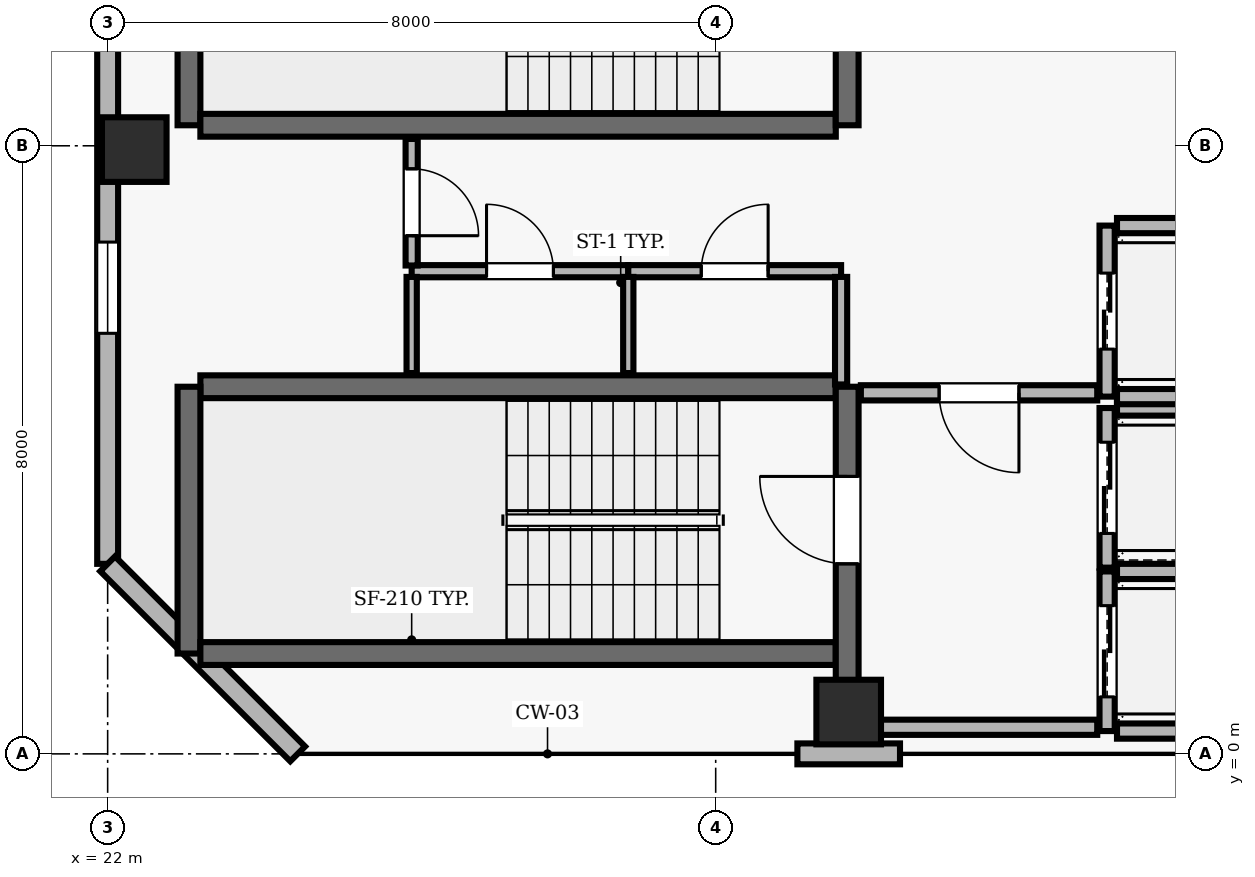
"""IFC4 building model, lengths in metres.
Left out: names, types, materials, properties, quantities, classifications, styles, units other than length and angle.
Written with IfcOpenShell. Run it as: python <this file> out.ifc"""

import sys

from ifc_helpers import new_model, si_unit, direction, frame, frame_2d, origin, origin_2d, place, context, subcontext, project, spatial, rectangle, extrude, element, fill, save


model = new_model("IFC4")
c1 = context("Model", 3, precision=1e-05, world=origin(), true_north=direction((0.0, 1.0)))
c2 = subcontext(c1, "Body", "Model", "MODEL_VIEW")
j1 = project(units=[si_unit("LENGTHUNIT", "METRE"), si_unit("PLANEANGLEUNIT", "RADIAN")], contexts=[c1])
p1 = place(None, origin())
s1 = spatial("IfcSite", under=j1, at=p1, CompositionType="ELEMENT")
p2 = place(p1, origin())
s2 = spatial("IfcBuilding", under=s1, at=p2, CompositionType="ELEMENT")
p3 = place(p2, frame((0.0, 0.0, 295.0)))
s3 = spatial("IfcBuildingStorey", under=s2, at=p3, CompositionType="ELEMENT", Elevation=295.0)
for number, where, z_axis, x_axis in (
    (1, (31.75, 0.55, 0.0), (0.0, 0.0, 1.0), (1.0, 0.0, 0.0)),
    (2, (22.35, 7.95, 0.0), (0.0, 0.0, 1.0), (1.0, 0.0, 0.0)),
):
    element("IfcColumn", number, at=place(p3, frame(where, z_axis=z_axis, x_axis=x_axis)), inside=s3, PredefinedType="COLUMN", context=c2, shape_type="SweptSolid", body=[
        extrude(rectangle(XDim=0.85, YDim=0.85, at=origin_2d()), origin(), (0.0, 0.0, 1.0), 3.9),
    ])
p4 = place(p3, frame((31.075, 0.0, 0.0), z_axis=(0.0, 0.0, 1.0), x_axis=(1.0, 0.0, 0.0)))
e3 = element("IfcWall", 3, at=p4, inside=s3, PredefinedType="SOLIDWALL", context=c2, shape_type="SweptSolid", body=[
    extrude(rectangle(XDim=1.35, YDim=0.275, at=frame_2d((0.675, 0.0))), origin(), (0.0, 0.0, 1.0), 3.69),
])
p5 = place(p3, frame((22.0, 35.3, 0.0), z_axis=(0.0, 0.0, 1.0), x_axis=(0.0, -1.0, 0.0)))
e4 = element("IfcWall", 4, at=p5, inside=s3, PredefinedType="SOLIDWALL", context=c2, shape_type="SweptSolid", body=[
    extrude(rectangle(XDim=32.8, YDim=0.275, at=frame_2d((16.4, 0.0))), origin(), (0.0, 0.0, 1.0), 3.69),
])
p6 = place(p5, frame((7.3, 0.0, 0.0)))
e5 = element("IfcOpeningElement", 5, at=p6, cuts=e4, PredefinedType="OPENING", context=c2, shape_type="SweptSolid", body=[
    extrude(rectangle(XDim=1.0, YDim=2.2, at=frame_2d((0.5, 1.1))), frame((0.0, 0.147, 0.0), z_axis=(0.0, -1.0, 0.0), x_axis=(1.0, 0.0, 0.0)), (0.0, 0.0, 1.0), 0.295),
])
p7 = place(p5, frame((1.233, 0.0, 0.9)))
e6 = element("IfcOpeningElement", 6, at=p7, cuts=e4, PredefinedType="OPENING", context=c2, shape_type="SweptSolid", body=[
    extrude(rectangle(XDim=1.2, YDim=1.6, at=frame_2d((0.6, 0.8))), frame((0.0, 0.147, 0.0), z_axis=(0.0, -1.0, 0.0), x_axis=(1.0, 0.0, 0.0)), (0.0, 0.0, 1.0), 0.295),
])
p8 = place(p5, frame((13.067, 0.0, 0.9)))
e7 = element("IfcOpeningElement", 7, at=p8, cuts=e4, PredefinedType="OPENING", context=c2, shape_type="SweptSolid", body=[
    extrude(rectangle(XDim=1.2, YDim=1.6, at=frame_2d((0.6, 0.8))), frame((0.0, 0.147, 0.0), z_axis=(0.0, -1.0, 0.0), x_axis=(1.0, 0.0, 0.0)), (0.0, 0.0, 1.0), 0.295),
])
p9 = place(p5, frame((18.533, 0.0, 0.9)))
e8 = element("IfcOpeningElement", 8, at=p9, cuts=e4, PredefinedType="OPENING", context=c2, shape_type="SweptSolid", body=[
    extrude(rectangle(XDim=1.2, YDim=1.6, at=frame_2d((0.6, 0.8))), frame((0.0, 0.147, 0.0), z_axis=(0.0, -1.0, 0.0), x_axis=(1.0, 0.0, 0.0)), (0.0, 0.0, 1.0), 0.295),
])
p10 = place(p5, frame((24.0, 0.0, 0.9)))
e9 = element("IfcOpeningElement", 9, at=p10, cuts=e4, PredefinedType="OPENING", context=c2, shape_type="SweptSolid", body=[
    extrude(rectangle(XDim=1.2, YDim=1.6, at=frame_2d((0.6, 0.8))), frame((0.0, 0.147, 0.0), z_axis=(0.0, -1.0, 0.0), x_axis=(1.0, 0.0, 0.0)), (0.0, 0.0, 1.0), 0.295),
])
p11 = place(p5, frame((28.567, 0.0, 0.9)))
e10 = element("IfcOpeningElement", 10, at=p11, cuts=e4, PredefinedType="OPENING", context=c2, shape_type="SweptSolid", body=[
    extrude(rectangle(XDim=1.2, YDim=1.6, at=frame_2d((0.6, 0.8))), frame((0.0, 0.147, 0.0), z_axis=(0.0, -1.0, 0.0), x_axis=(1.0, 0.0, 0.0)), (0.0, 0.0, 1.0), 0.295),
])
p12 = place(p3, frame((22.0, 2.5, 0.0), z_axis=(0.0, 0.0, 1.0), x_axis=(0.707106781187, -0.707106781187, 0.0)))
e11 = element("IfcWall", 11, at=p12, inside=s3, PredefinedType="SOLIDWALL", context=c2, shape_type="SweptSolid", body=[
    extrude(rectangle(XDim=3.536, YDim=0.275, at=frame_2d((1.768, 0.0))), origin(), (0.0, 0.0, 1.0), 3.69),
])
p13 = place(p3, frame((31.58, 4.83, 0.0), z_axis=(0.0, 0.0, 1.0), x_axis=(-1.0, 0.0, 0.0)))
e12 = element("IfcWall", 12, at=p13, inside=s3, PredefinedType="SHEAR", context=c2, shape_type="SweptSolid", body=[
    extrude(rectangle(XDim=8.36, YDim=0.3, at=frame_2d((4.18, 0.0))), origin(), (0.0, 0.0, 1.0), 3.69),
])
p14 = place(p3, frame((23.07, 4.83, 0.0), z_axis=(0.0, 0.0, 1.0), x_axis=(0.0, -1.0, 0.0)))
e13 = element("IfcWall", 13, at=p14, inside=s3, PredefinedType="SHEAR", context=c2, shape_type="SweptSolid", body=[
    extrude(rectangle(XDim=3.51, YDim=0.3, at=frame_2d((1.755, 0.0))), origin(), (0.0, 0.0, 1.0), 3.69),
])
p15 = place(p3, frame((23.22, 1.32, 0.0), z_axis=(0.0, 0.0, 1.0), x_axis=(1.0, 0.0, 0.0)))
e14 = element("IfcWall", 14, at=p15, inside=s3, PredefinedType="SHEAR", context=c2, shape_type="SweptSolid", body=[
    extrude(rectangle(XDim=8.36, YDim=0.3, at=frame_2d((4.18, 0.0))), origin(), (0.0, 0.0, 1.0), 3.69),
])
p16 = place(p3, frame((31.73, 0.96, 0.0), z_axis=(0.0, 0.0, 1.0), x_axis=(0.0, 1.0, 0.0)))
e15 = element("IfcWall", 15, at=p16, inside=s3, PredefinedType="SHEAR", context=c2, shape_type="SweptSolid", body=[
    extrude(rectangle(XDim=3.87, YDim=0.3, at=frame_2d((1.935, 0.0))), origin(), (0.0, 0.0, 1.0), 3.69),
])
p17 = place(p16, frame((1.54, 0.0, 0.0)))
e16 = element("IfcOpeningElement", 16, at=p17, cuts=e15, PredefinedType="OPENING", context=c2, shape_type="SweptSolid", body=[
    extrude(rectangle(XDim=1.15, YDim=2.15, at=frame_2d((0.575, 1.075))), frame((0.0, 0.16, 0.0), z_axis=(0.0, -1.0, 0.0), x_axis=(1.0, 0.0, 0.0)), (0.0, 0.0, 1.0), 0.32),
])
p18 = place(p3, frame((23.07, 11.78, 0.0), z_axis=(0.0, 0.0, 1.0), x_axis=(0.0, -1.0, 0.0)))
e17 = element("IfcWall", 17, at=p18, inside=s3, PredefinedType="SHEAR", context=c2, shape_type="SweptSolid", body=[
    extrude(rectangle(XDim=3.51, YDim=0.3, at=frame_2d((1.755, 0.0))), origin(), (0.0, 0.0, 1.0), 3.69),
])
p19 = place(p3, frame((23.22, 8.27, 0.0), z_axis=(0.0, 0.0, 1.0), x_axis=(1.0, 0.0, 0.0)))
e18 = element("IfcWall", 18, at=p19, inside=s3, PredefinedType="SHEAR", context=c2, shape_type="SweptSolid", body=[
    extrude(rectangle(XDim=8.36, YDim=0.3, at=frame_2d((4.18, 0.0))), origin(), (0.0, 0.0, 1.0), 3.69),
])
p20 = place(p3, frame((31.73, 8.27, 0.0), z_axis=(0.0, 0.0, 1.0), x_axis=(0.0, 1.0, 0.0)))
e19 = element("IfcWall", 19, at=p20, inside=s3, PredefinedType="SHEAR", context=c2, shape_type="SweptSolid", body=[
    extrude(rectangle(XDim=3.51, YDim=0.3, at=frame_2d((1.755, 0.0))), origin(), (0.0, 0.0, 1.0), 3.69),
])
p21 = place(p20, frame((1.18, 0.0, 0.0)))
e20 = element("IfcOpeningElement", 20, at=p21, cuts=e19, PredefinedType="OPENING", context=c2, shape_type="SweptSolid", body=[
    extrude(rectangle(XDim=1.15, YDim=2.15, at=frame_2d((0.575, 1.075))), frame((0.0, 0.16, 0.0), z_axis=(0.0, -1.0, 0.0), x_axis=(1.0, 0.0, 0.0)), (0.0, 0.0, 1.0), 0.32),
])
p22 = place(p3, frame((35.15, 2.4, 0.0), z_axis=(0.0, 0.0, 1.0), x_axis=(0.0, -1.0, 0.0)))
e21 = element("IfcWall", 21, at=p22, inside=s3, PredefinedType="SOLIDWALL", context=c2, shape_type="SweptSolid", body=[
    extrude(rectangle(XDim=2.1, YDim=0.2, at=frame_2d((1.05, 0.0))), origin(), (0.0, 0.0, 1.0), 3.69),
])
p23 = place(p22, frame((0.45, 0.0, 0.0)))
e22 = element("IfcOpeningElement", 22, at=p23, cuts=e21, PredefinedType="OPENING", context=c2, shape_type="SweptSolid", body=[
    extrude(rectangle(XDim=1.2, YDim=2.15, at=frame_2d((0.6, 1.075))), frame((0.0, 0.11, 0.0), z_axis=(0.0, -1.0, 0.0), x_axis=(1.0, 0.0, 0.0)), (0.0, 0.0, 1.0), 0.22),
])
for number, where, z_axis, x_axis in (
    (23, (35.28, 0.3, 0.0), (0.0, 0.0, 1.0), (1.0, 0.0, 0.0)),
    (24, (37.42, 2.4, 0.0), (0.0, 0.0, 1.0), (-1.0, 0.0, 0.0)),
):
    element("IfcWall", number, at=place(p3, frame(where, z_axis=z_axis, x_axis=x_axis)), inside=s3, PredefinedType="SOLIDWALL", context=c2, shape_type="SweptSolid", body=[
        extrude(rectangle(XDim=2.14, YDim=0.2, at=frame_2d((1.07, 0.0))), origin(), (0.0, 0.0, 1.0), 3.69),
    ])
p24 = place(p3, frame((35.15, 4.55, 0.0), z_axis=(0.0, 0.0, 1.0), x_axis=(0.0, -1.0, 0.0)))
e25 = element("IfcWall", 25, at=p24, inside=s3, PredefinedType="SOLIDWALL", context=c2, shape_type="SweptSolid", body=[
    extrude(rectangle(XDim=2.1, YDim=0.2, at=frame_2d((1.05, 0.0))), origin(), (0.0, 0.0, 1.0), 3.69),
])
p25 = place(p24, frame((0.45, 0.0, 0.0)))
e26 = element("IfcOpeningElement", 26, at=p25, cuts=e25, PredefinedType="OPENING", context=c2, shape_type="SweptSolid", body=[
    extrude(rectangle(XDim=1.2, YDim=2.15, at=frame_2d((0.6, 1.075))), frame((0.0, 0.11, 0.0), z_axis=(0.0, -1.0, 0.0), x_axis=(1.0, 0.0, 0.0)), (0.0, 0.0, 1.0), 0.22),
])
p26 = place(p3, frame((37.42, 4.55, 0.0), z_axis=(0.0, 0.0, 1.0), x_axis=(-1.0, 0.0, 0.0)))
e27 = element("IfcWall", 27, at=p26, inside=s3, PredefinedType="SOLIDWALL", context=c2, shape_type="SweptSolid", body=[
    extrude(rectangle(XDim=2.14, YDim=0.2, at=frame_2d((1.07, 0.0))), origin(), (0.0, 0.0, 1.0), 3.69),
])
p27 = place(p3, frame((35.15, 6.95, 0.0), z_axis=(0.0, 0.0, 1.0), x_axis=(0.0, -1.0, 0.0)))
e28 = element("IfcWall", 28, at=p27, inside=s3, PredefinedType="SOLIDWALL", context=c2, shape_type="SweptSolid", body=[
    extrude(rectangle(XDim=2.25, YDim=0.2, at=frame_2d((1.125, 0.0))), origin(), (0.0, 0.0, 1.0), 3.69),
])
p28 = place(p27, frame((0.625, 0.0, 0.0)))
e29 = element("IfcOpeningElement", 29, at=p28, cuts=e28, PredefinedType="OPENING", context=c2, shape_type="SweptSolid", body=[
    extrude(rectangle(XDim=1.0, YDim=2.1, at=frame_2d((0.5, 1.05))), frame((0.0, 0.11, 0.0), z_axis=(0.0, -1.0, 0.0), x_axis=(1.0, 0.0, 0.0)), (0.0, 0.0, 1.0), 0.22),
])
for number, where, z_axis, x_axis in (
    (30, (35.28, 4.7, 0.0), (0.0, 0.0, 1.0), (1.0, 0.0, 0.0)),
    (31, (37.42, 6.95, 0.0), (0.0, 0.0, 1.0), (-1.0, 0.0, 0.0)),
):
    element("IfcWall", number, at=place(p3, frame(where, z_axis=z_axis, x_axis=x_axis)), inside=s3, PredefinedType="SOLIDWALL", context=c2, shape_type="SweptSolid", body=[
        extrude(rectangle(XDim=2.14, YDim=0.2, at=frame_2d((1.07, 0.0))), origin(), (0.0, 0.0, 1.0), 3.69),
    ])
p29 = place(p3, frame((26.0, 6.35, 0.0), z_axis=(0.0, 0.0, 1.0), x_axis=(1.0, 0.0, 0.0)))
e32 = element("IfcWall", 32, at=p29, inside=s3, PredefinedType="PARTITIONING", context=c2, shape_type="SweptSolid", body=[
    extrude(rectangle(XDim=2.85, YDim=0.16, at=frame_2d((1.425, 0.0))), origin(), (0.0, 0.0, 1.0), 3.69),
])
p30 = place(p29, frame((0.985, 0.0, 0.0)))
e33 = element("IfcOpeningElement", 33, at=p30, cuts=e32, PredefinedType="OPENING", context=c2, shape_type="SweptSolid", body=[
    extrude(rectangle(XDim=0.88, YDim=2.1, at=frame_2d((0.44, 1.05))), frame((0.0, 0.09, 0.0), z_axis=(0.0, -1.0, 0.0), x_axis=(1.0, 0.0, 0.0)), (0.0, 0.0, 1.0), 0.18),
])
p31 = place(p3, frame((28.85, 6.35, 0.0), z_axis=(0.0, 0.0, 1.0), x_axis=(1.0, 0.0, 0.0)))
e34 = element("IfcWall", 34, at=p31, inside=s3, PredefinedType="PARTITIONING", context=c2, shape_type="SweptSolid", body=[
    extrude(rectangle(XDim=2.8, YDim=0.16, at=frame_2d((1.4, 0.0))), origin(), (0.0, 0.0, 1.0), 3.69),
])
p32 = place(p31, frame((0.96, 0.0, 0.0)))
e35 = element("IfcOpeningElement", 35, at=p32, cuts=e34, PredefinedType="OPENING", context=c2, shape_type="SweptSolid", body=[
    extrude(rectangle(XDim=0.88, YDim=2.1, at=frame_2d((0.44, 1.05))), frame((0.0, 0.09, 0.0), z_axis=(0.0, -1.0, 0.0), x_axis=(1.0, 0.0, 0.0)), (0.0, 0.0, 1.0), 0.18),
])
p33 = place(p3, frame((31.65, 0.35, 0.0), z_axis=(0.0, 0.0, 1.0), x_axis=(1.0, 0.0, 0.0)))
e36 = element("IfcWall", 36, at=p33, inside=s3, PredefinedType="SOLIDWALL", context=c2, shape_type="SweptSolid", body=[
    extrude(rectangle(XDim=3.37, YDim=0.2, at=frame_2d((1.685, 0.0))), origin(), (0.0, 0.0, 1.0), 3.69),
])
p34 = place(p3, frame((35.02, 4.75, 0.0), z_axis=(0.0, 0.0, 1.0), x_axis=(-1.0, 0.0, 0.0)))
e37 = element("IfcWall", 37, at=p34, inside=s3, PredefinedType="SOLIDWALL", context=c2, shape_type="SweptSolid", body=[
    extrude(rectangle(XDim=3.11, YDim=0.2, at=frame_2d((1.555, 0.0))), origin(), (0.0, 0.0, 1.0), 3.69),
])
p35 = place(p34, frame((1.03, 0.0, 0.0)))
e38 = element("IfcOpeningElement", 38, at=p35, cuts=e37, PredefinedType="OPENING", context=c2, shape_type="SweptSolid", body=[
    extrude(rectangle(XDim=1.05, YDim=2.15, at=frame_2d((0.525, 1.075))), frame((0.0, 0.11, 0.0), z_axis=(0.0, -1.0, 0.0), x_axis=(1.0, 0.0, 0.0)), (0.0, 0.0, 1.0), 0.22),
])
p36 = place(p3, frame((26.0, 5.01, 0.0), z_axis=(0.0, 0.0, 1.0), x_axis=(0.0, 1.0, 0.0)))
e39 = element("IfcWall", 39, at=p36, inside=s3, PredefinedType="PARTITIONING", context=c2, shape_type="SweptSolid", body=[
    extrude(rectangle(XDim=1.265, YDim=0.135, at=frame_2d((0.632, 0.0))), origin(), (0.0, 0.0, 1.0), 3.69),
])
p37 = place(p3, frame((26.0, 8.09, 0.0), z_axis=(0.0, 0.0, 1.0), x_axis=(0.0, -1.0, 0.0)))
e40 = element("IfcWall", 40, at=p37, inside=s3, PredefinedType="PARTITIONING", context=c2, shape_type="SweptSolid", body=[
    extrude(rectangle(XDim=1.665, YDim=0.16, at=frame_2d((0.833, 0.0))), origin(), (0.0, 0.0, 1.0), 3.69),
])
p38 = place(p37, frame((0.393, 0.0, 0.0)))
e41 = element("IfcOpeningElement", 41, at=p38, cuts=e40, PredefinedType="OPENING", context=c2, shape_type="SweptSolid", body=[
    extrude(rectangle(XDim=0.88, YDim=2.1, at=frame_2d((0.44, 1.05))), frame((0.0, 0.09, 0.0), z_axis=(0.0, -1.0, 0.0), x_axis=(1.0, 0.0, 0.0)), (0.0, 0.0, 1.0), 0.18),
])
p39 = place(p3, frame((28.85, 5.01, 0.0), z_axis=(0.0, 0.0, 1.0), x_axis=(0.0, 1.0, 0.0)))
e42 = element("IfcWall", 42, at=p39, inside=s3, PredefinedType="PARTITIONING", context=c2, shape_type="SweptSolid", body=[
    extrude(rectangle(XDim=1.265, YDim=0.135, at=frame_2d((0.632, 0.0))), origin(), (0.0, 0.0, 1.0), 3.69),
])
p40 = place(p3, frame((31.65, 4.86, 0.0), z_axis=(0.0, 0.0, 1.0), x_axis=(0.0, 1.0, 0.0)))
e43 = element("IfcWall", 43, at=p40, inside=s3, PredefinedType="PARTITIONING", context=c2, shape_type="SweptSolid", body=[
    extrude(rectangle(XDim=1.415, YDim=0.16, at=frame_2d((0.708, 0.0))), origin(), (0.0, 0.0, 1.0), 3.69),
])
p41 = place(p11, origin())
e44 = element("IfcWindow", 44, at=p41, inside=s3, PartitioningType="SINGLE_PANEL", PredefinedType="WINDOW", context=c2, shape_type="SweptSolid", body=[
    extrude(rectangle(XDim=1.2, YDim=1.6, at=frame_2d((0.6, 0.8))), frame((0.0, 0.03, 0.0), z_axis=(0.0, -1.0, 0.0), x_axis=(1.0, 0.0, 0.0)), (0.0, 0.0, 1.0), 0.06),
])
fill(e10, e44)
p42 = place(p17, origin())
e45 = element("IfcDoor", 45, at=p42, inside=s3, OperationType="SINGLE_SWING_RIGHT", PredefinedType="DOOR", context=c2, shape_type="SweptSolid", body=[
    extrude(rectangle(XDim=1.15, YDim=2.15, at=frame_2d((0.575, 1.075))), frame((0.0, 0.025, 0.0), z_axis=(0.0, -1.0, 0.0), x_axis=(1.0, 0.0, 0.0)), (0.0, 0.0, 1.0), 0.05),
])
fill(e16, e45)
p43 = place(p23, origin())
e46 = element("IfcDoor", 46, at=p43, inside=s3, OperationType="DOUBLE_DOOR_SLIDING", PredefinedType="DOOR", context=c2, shape_type="SweptSolid", body=[
    extrude(rectangle(XDim=1.2, YDim=2.15, at=frame_2d((0.6, 1.075))), frame((0.0, 0.025, 0.0), z_axis=(0.0, -1.0, 0.0), x_axis=(1.0, 0.0, 0.0)), (0.0, 0.0, 1.0), 0.05),
])
fill(e22, e46)
p44 = place(p25, origin())
e47 = element("IfcDoor", 47, at=p44, inside=s3, OperationType="DOUBLE_DOOR_SLIDING", PredefinedType="DOOR", context=c2, shape_type="SweptSolid", body=[
    extrude(rectangle(XDim=1.2, YDim=2.15, at=frame_2d((0.6, 1.075))), frame((0.0, 0.025, 0.0), z_axis=(0.0, -1.0, 0.0), x_axis=(1.0, 0.0, 0.0)), (0.0, 0.0, 1.0), 0.05),
])
fill(e26, e47)
p45 = place(p28, origin())
e48 = element("IfcDoor", 48, at=p45, inside=s3, OperationType="DOUBLE_DOOR_SLIDING", PredefinedType="DOOR", context=c2, shape_type="SweptSolid", body=[
    extrude(rectangle(XDim=1.0, YDim=2.1, at=frame_2d((0.5, 1.05))), frame((0.0, 0.025, 0.0), z_axis=(0.0, -1.0, 0.0), x_axis=(1.0, 0.0, 0.0)), (0.0, 0.0, 1.0), 0.05),
])
fill(e29, e48)
p46 = place(p35, origin())
e49 = element("IfcDoor", 49, at=p46, inside=s3, OperationType="SINGLE_SWING_LEFT", PredefinedType="DOOR", context=c2, shape_type="SweptSolid", body=[
    extrude(rectangle(XDim=1.05, YDim=2.15, at=frame_2d((0.525, 1.075))), frame((0.0, 0.025, 0.0), z_axis=(0.0, -1.0, 0.0), x_axis=(1.0, 0.0, 0.0)), (0.0, 0.0, 1.0), 0.05),
])
fill(e38, e49)
p47 = place(p38, origin())
e50 = element("IfcDoor", 50, at=p47, inside=s3, OperationType="SINGLE_SWING_RIGHT", PredefinedType="DOOR", context=c2, shape_type="SweptSolid", body=[
    extrude(rectangle(XDim=0.88, YDim=2.1, at=frame_2d((0.44, 1.05))), frame((0.0, 0.025, 0.0), z_axis=(0.0, -1.0, 0.0), x_axis=(1.0, 0.0, 0.0)), (0.0, 0.0, 1.0), 0.05),
])
fill(e41, e50)
p48 = place(p30, origin())
e51 = element("IfcDoor", 51, at=p48, inside=s3, OperationType="SINGLE_SWING_LEFT", PredefinedType="DOOR", context=c2, shape_type="SweptSolid", body=[
    extrude(rectangle(XDim=0.88, YDim=2.1, at=frame_2d((0.44, 1.05))), frame((0.0, 0.025, 0.0), z_axis=(0.0, -1.0, 0.0), x_axis=(1.0, 0.0, 0.0)), (0.0, 0.0, 1.0), 0.05),
])
fill(e33, e51)
p49 = place(p32, origin())
e52 = element("IfcDoor", 52, at=p49, inside=s3, OperationType="SINGLE_SWING_RIGHT", PredefinedType="DOOR", context=c2, shape_type="SweptSolid", body=[
    extrude(rectangle(XDim=0.88, YDim=2.1, at=frame_2d((0.44, 1.05))), frame((0.0, 0.025, 0.0), z_axis=(0.0, -1.0, 0.0), x_axis=(1.0, 0.0, 0.0)), (0.0, 0.0, 1.0), 0.05),
])
fill(e35, e52)
save(model, sys.argv[1])
